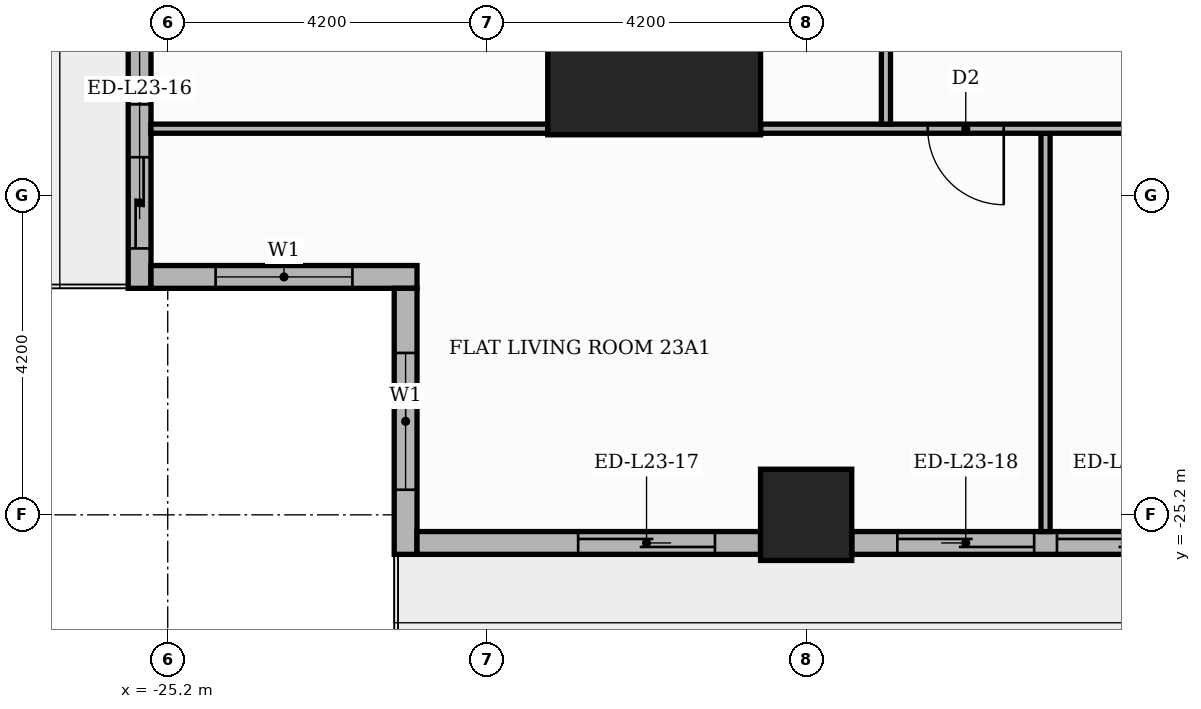
"""IFC4 building model, lengths in metres.
Left out: names, types, materials, properties, quantities, classifications, styles, units other than length and angle.
Written with IfcOpenShell. Run it as: python <this file> out.ifc"""

import sys

from ifc_helpers import new_model, si_unit, direction, frame, frame_2d, origin, origin_2d, place, context, subcontext, project, spatial, rectangle, extrude, element, fill, save


model = new_model("IFC4")
c1 = context("Model", 3, precision=1e-05, world=origin(), true_north=direction((0.0, 1.0)))
c2 = subcontext(c1, "Body", "Model", "MODEL_VIEW")
j1 = project(units=[si_unit("LENGTHUNIT", "METRE"), si_unit("PLANEANGLEUNIT", "RADIAN")], contexts=[c1])
p1 = place(None, origin())
s1 = spatial("IfcSite", under=j1, at=p1, CompositionType="ELEMENT")
p2 = place(p1, origin())
s2 = spatial("IfcBuilding", under=s1, at=p2, CompositionType="ELEMENT")
p3 = place(p2, frame((0.0, 0.0, 98.7)))
s3 = spatial("IfcBuildingStorey", under=s2, at=p3, CompositionType="ELEMENT", Elevation=98.7)
p4 = place(p3, frame((-18.8, -18.8, 0.0), z_axis=(0.0, 0.0, 1.0), x_axis=(1.0, 0.0, 0.0)))
e1 = element("IfcColumn", 1, at=p4, inside=s3, PredefinedType="COLUMN", context=c2, shape_type="SweptSolid", body=[
    extrude(rectangle(XDim=2.8, YDim=2.8, at=origin_2d()), origin(), (0.0, 0.0, 1.0), 3.9),
])
p5 = place(p3, frame((-16.8, -25.2, 0.0), z_axis=(0.0, 0.0, 1.0), x_axis=(1.0, 0.0, 0.0)))
e2 = element("IfcColumn", 2, at=p5, inside=s3, PredefinedType="COLUMN", context=c2, shape_type="SweptSolid", body=[
    extrude(rectangle(XDim=1.2, YDim=1.2, at=origin_2d()), origin(), (0.0, 0.0, 1.0), 3.9),
])
p6 = place(p3, frame((-25.57, -17.4, 0.0), z_axis=(0.0, 0.0, 1.0), x_axis=(0.0, -1.0, 0.0)))
e3 = element("IfcWall", 3, at=p6, inside=s3, PredefinedType="STANDARD", context=c2, shape_type="SweptSolid", body=[
    extrude(rectangle(XDim=4.82, YDim=0.3, at=frame_2d((2.41, 0.0))), origin(), (0.0, 0.0, 1.0), 3.48),
])
p7 = place(p6, frame((0.6, 0.0, 0.9)))
e4 = element("IfcOpeningElement", 4, at=p7, cuts=e3, PredefinedType="OPENING", context=c2, shape_type="SweptSolid", body=[
    extrude(rectangle(XDim=1.8, YDim=2.1, at=frame_2d((0.9, 1.05))), frame((0.0, 0.16, 0.0), z_axis=(0.0, -1.0, 0.0), x_axis=(1.0, 0.0, 0.0)), (0.0, 0.0, 1.0), 0.32),
])
p8 = place(p6, frame((3.095, 0.0, 0.0)))
e5 = element("IfcOpeningElement", 5, at=p8, cuts=e3, PredefinedType="OPENING", context=c2, shape_type="SweptSolid", body=[
    extrude(rectangle(XDim=1.2, YDim=2.4, at=frame_2d((0.6, 1.2))), frame((0.0, 0.16, 0.0), z_axis=(0.0, -1.0, 0.0), x_axis=(1.0, 0.0, 0.0)), (0.0, 0.0, 1.0), 0.32),
])
p9 = place(p3, frame((-25.42, -22.07, 0.0), z_axis=(0.0, 0.0, 1.0), x_axis=(1.0, 0.0, 0.0)))
e6 = element("IfcWall", 6, at=p9, inside=s3, PredefinedType="STANDARD", context=c2, shape_type="SweptSolid", body=[
    extrude(rectangle(XDim=3.5, YDim=0.3, at=frame_2d((1.75, 0.0))), origin(), (0.0, 0.0, 1.0), 3.48),
])
p10 = place(p9, frame((0.85, 0.0, 0.9)))
e7 = element("IfcOpeningElement", 7, at=p10, cuts=e6, PredefinedType="OPENING", context=c2, shape_type="SweptSolid", body=[
    extrude(rectangle(XDim=1.8, YDim=2.1, at=frame_2d((0.9, 1.05))), frame((0.0, 0.16, 0.0), z_axis=(0.0, -1.0, 0.0), x_axis=(1.0, 0.0, 0.0)), (0.0, 0.0, 1.0), 0.32),
])
p11 = place(p3, frame((-22.07, -22.22, 0.0), z_axis=(0.0, 0.0, 1.0), x_axis=(0.0, -1.0, 0.0)))
e8 = element("IfcWall", 8, at=p11, inside=s3, PredefinedType="STANDARD", context=c2, shape_type="SweptSolid", body=[
    extrude(rectangle(XDim=3.5, YDim=0.3, at=frame_2d((1.75, 0.0))), origin(), (0.0, 0.0, 1.0), 3.48),
])
p12 = place(p11, frame((0.85, 0.0, 0.9)))
e9 = element("IfcOpeningElement", 9, at=p12, cuts=e8, PredefinedType="OPENING", context=c2, shape_type="SweptSolid", body=[
    extrude(rectangle(XDim=1.8, YDim=2.1, at=frame_2d((0.9, 1.05))), frame((0.0, 0.16, 0.0), z_axis=(0.0, -1.0, 0.0), x_axis=(1.0, 0.0, 0.0)), (0.0, 0.0, 1.0), 0.32),
])
p13 = place(p3, frame((-21.92, -25.57, 0.0), z_axis=(0.0, 0.0, 1.0), x_axis=(1.0, 0.0, 0.0)))
e10 = element("IfcWall", 10, at=p13, inside=s3, PredefinedType="STANDARD", context=c2, shape_type="SweptSolid", body=[
    extrude(rectangle(XDim=4.52, YDim=0.3, at=frame_2d((2.26, 0.0))), origin(), (0.0, 0.0, 1.0), 3.48),
])
p14 = place(p13, frame((2.12, 0.0, 0.0)))
e11 = element("IfcOpeningElement", 11, at=p14, cuts=e10, PredefinedType="OPENING", context=c2, shape_type="SweptSolid", body=[
    extrude(rectangle(XDim=1.8, YDim=2.4, at=frame_2d((0.9, 1.2))), frame((0.0, 0.16, 0.0), z_axis=(0.0, -1.0, 0.0), x_axis=(1.0, 0.0, 0.0)), (0.0, 0.0, 1.0), 0.32),
])
p15 = place(p3, frame((-16.2, -25.57, 0.0), z_axis=(0.0, 0.0, 1.0), x_axis=(1.0, 0.0, 0.0)))
e12 = element("IfcWall", 12, at=p15, inside=s3, PredefinedType="STANDARD", context=c2, shape_type="SweptSolid", body=[
    extrude(rectangle(XDim=7.2, YDim=0.3, at=frame_2d((3.6, 0.0))), origin(), (0.0, 0.0, 1.0), 3.48),
])
p16 = place(p15, frame((0.6, 0.0, 0.0)))
e13 = element("IfcOpeningElement", 13, at=p16, cuts=e12, PredefinedType="OPENING", context=c2, shape_type="SweptSolid", body=[
    extrude(rectangle(XDim=1.8, YDim=2.4, at=frame_2d((0.9, 1.2))), frame((0.0, 0.16, 0.0), z_axis=(0.0, -1.0, 0.0), x_axis=(1.0, 0.0, 0.0)), (0.0, 0.0, 1.0), 0.32),
])
p17 = place(p15, frame((2.7, 0.0, 0.0)))
e14 = element("IfcOpeningElement", 14, at=p17, cuts=e12, PredefinedType="OPENING", context=c2, shape_type="SweptSolid", body=[
    extrude(rectangle(XDim=1.8, YDim=2.4, at=frame_2d((0.9, 1.2))), frame((0.0, 0.16, 0.0), z_axis=(0.0, -1.0, 0.0), x_axis=(1.0, 0.0, 0.0)), (0.0, 0.0, 1.0), 0.32),
])
p18 = place(p15, frame((4.8, 0.0, 0.9)))
e15 = element("IfcOpeningElement", 15, at=p18, cuts=e12, PredefinedType="OPENING", context=c2, shape_type="SweptSolid", body=[
    extrude(rectangle(XDim=1.8, YDim=2.1, at=frame_2d((0.9, 1.05))), frame((0.0, 0.16, 0.0), z_axis=(0.0, -1.0, 0.0), x_axis=(1.0, 0.0, 0.0)), (0.0, 0.0, 1.0), 0.32),
])
p19 = place(p3, frame((-13.65, -25.42, 0.0), z_axis=(0.0, 0.0, 1.0), x_axis=(0.0, 1.0, 0.0)))
e16 = element("IfcWall", 16, at=p19, inside=s3, PredefinedType="PARTITIONING", context=c2, shape_type="SweptSolid", body=[
    extrude(rectangle(XDim=5.24, YDim=0.12, at=frame_2d((2.62, 0.0))), origin(), (0.0, 0.0, 1.0), 3.48),
])
p20 = place(p3, frame((-25.42, -20.12, 0.0), z_axis=(0.0, 0.0, 1.0), x_axis=(1.0, 0.0, 0.0)))
e17 = element("IfcWall", 17, at=p20, inside=s3, PredefinedType="PARTITIONING", context=c2, shape_type="SweptSolid", body=[
    extrude(rectangle(XDim=5.22, YDim=0.12, at=frame_2d((2.61, 0.0))), origin(), (0.0, 0.0, 1.0), 3.48),
])
p21 = place(p3, frame((-17.4, -20.12, 0.0), z_axis=(0.0, 0.0, 1.0), x_axis=(1.0, 0.0, 0.0)))
e18 = element("IfcWall", 18, at=p21, inside=s3, PredefinedType="PARTITIONING", context=c2, shape_type="SweptSolid", body=[
    extrude(rectangle(XDim=12.05, YDim=0.12, at=frame_2d((6.025, 0.0))), origin(), (0.0, 0.0, 1.0), 3.48),
])
p22 = place(p21, frame((2.2, 0.0, 0.0)))
e19 = element("IfcOpeningElement", 19, at=p22, cuts=e18, PredefinedType="OPENING", context=c2, shape_type="SweptSolid", body=[
    extrude(rectangle(XDim=1.0, YDim=2.1, at=frame_2d((0.5, 1.05))), frame((0.0, 0.07, 0.0), z_axis=(0.0, -1.0, 0.0), x_axis=(1.0, 0.0, 0.0)), (0.0, 0.0, 1.0), 0.14),
])
p23 = place(p21, frame((5.4, 0.0, 0.0)))
e20 = element("IfcOpeningElement", 20, at=p23, cuts=e18, PredefinedType="OPENING", context=c2, shape_type="SweptSolid", body=[
    extrude(rectangle(XDim=0.9, YDim=2.1, at=frame_2d((0.45, 1.05))), frame((0.0, 0.07, 0.0), z_axis=(0.0, -1.0, 0.0), x_axis=(1.0, 0.0, 0.0)), (0.0, 0.0, 1.0), 0.14),
])
p24 = place(p3, frame((-15.75, -20.06, 0.0), z_axis=(0.0, 0.0, 1.0), x_axis=(0.0, 1.0, 0.0)))
e21 = element("IfcWall", 21, at=p24, inside=s3, PredefinedType="PARTITIONING", context=c2, shape_type="SweptSolid", body=[
    extrude(rectangle(XDim=6.31, YDim=0.12, at=frame_2d((3.155, 0.0))), origin(), (0.0, 0.0, 1.0), 3.48),
])
p25 = place(p24, frame((2.675, 0.0, 0.0)))
e22 = element("IfcOpeningElement", 22, at=p25, cuts=e21, PredefinedType="OPENING", context=c2, shape_type="SweptSolid", body=[
    extrude(rectangle(XDim=1.0, YDim=2.1, at=frame_2d((0.5, 1.05))), frame((0.0, 0.07, 0.0), z_axis=(0.0, -1.0, 0.0), x_axis=(1.0, 0.0, 0.0)), (0.0, 0.0, 1.0), 0.14),
])
p26 = place(p7, origin())
e23 = element("IfcWindow", 23, at=p26, inside=s3, PartitioningType="SINGLE_PANEL", PredefinedType="WINDOW", context=c2, shape_type="SweptSolid", body=[
    extrude(rectangle(XDim=1.8, YDim=2.1, at=frame_2d((0.9, 1.05))), frame((0.0, 0.03, 0.0), z_axis=(0.0, -1.0, 0.0), x_axis=(1.0, 0.0, 0.0)), (0.0, 0.0, 1.0), 0.06),
])
fill(e4, e23)
p27 = place(p8, origin())
e24 = element("IfcDoor", 24, at=p27, inside=s3, OperationType="SLIDING_TO_RIGHT", PredefinedType="DOOR", context=c2, shape_type="SweptSolid", body=[
    extrude(rectangle(XDim=1.2, YDim=2.4, at=frame_2d((0.6, 1.2))), frame((0.0, 0.025, 0.0), z_axis=(0.0, -1.0, 0.0), x_axis=(1.0, 0.0, 0.0)), (0.0, 0.0, 1.0), 0.05),
])
fill(e5, e24)
p28 = place(p10, origin())
e25 = element("IfcWindow", 25, at=p28, inside=s3, PartitioningType="SINGLE_PANEL", PredefinedType="WINDOW", context=c2, shape_type="SweptSolid", body=[
    extrude(rectangle(XDim=1.8, YDim=2.1, at=frame_2d((0.9, 1.05))), frame((0.0, 0.03, 0.0), z_axis=(0.0, -1.0, 0.0), x_axis=(1.0, 0.0, 0.0)), (0.0, 0.0, 1.0), 0.06),
])
fill(e7, e25)
p29 = place(p12, origin())
e26 = element("IfcWindow", 26, at=p29, inside=s3, PartitioningType="SINGLE_PANEL", PredefinedType="WINDOW", context=c2, shape_type="SweptSolid", body=[
    extrude(rectangle(XDim=1.8, YDim=2.1, at=frame_2d((0.9, 1.05))), frame((0.0, 0.03, 0.0), z_axis=(0.0, -1.0, 0.0), x_axis=(1.0, 0.0, 0.0)), (0.0, 0.0, 1.0), 0.06),
])
fill(e9, e26)
p30 = place(p14, origin())
e27 = element("IfcDoor", 27, at=p30, inside=s3, OperationType="SLIDING_TO_RIGHT", PredefinedType="DOOR", context=c2, shape_type="SweptSolid", body=[
    extrude(rectangle(XDim=1.8, YDim=2.4, at=frame_2d((0.9, 1.2))), frame((0.0, 0.025, 0.0), z_axis=(0.0, -1.0, 0.0), x_axis=(1.0, 0.0, 0.0)), (0.0, 0.0, 1.0), 0.05),
])
fill(e11, e27)
p31 = place(p16, origin())
e28 = element("IfcDoor", 28, at=p31, inside=s3, OperationType="SLIDING_TO_LEFT", PredefinedType="DOOR", context=c2, shape_type="SweptSolid", body=[
    extrude(rectangle(XDim=1.8, YDim=2.4, at=frame_2d((0.9, 1.2))), frame((0.0, 0.025, 0.0), z_axis=(0.0, -1.0, 0.0), x_axis=(1.0, 0.0, 0.0)), (0.0, 0.0, 1.0), 0.05),
])
fill(e13, e28)
p32 = place(p17, origin())
e29 = element("IfcDoor", 29, at=p32, inside=s3, OperationType="SLIDING_TO_RIGHT", PredefinedType="DOOR", context=c2, shape_type="SweptSolid", body=[
    extrude(rectangle(XDim=1.8, YDim=2.4, at=frame_2d((0.9, 1.2))), frame((0.0, 0.025, 0.0), z_axis=(0.0, -1.0, 0.0), x_axis=(1.0, 0.0, 0.0)), (0.0, 0.0, 1.0), 0.05),
])
fill(e14, e29)
p33 = place(p22, frame((1.0, 0.0, 0.0), z_axis=(0.0, 0.0, 1.0), x_axis=(-1.0, 0.0, 0.0)))
e30 = element("IfcDoor", 30, at=p33, inside=s3, OperationType="SINGLE_SWING_RIGHT", PredefinedType="DOOR", context=c2, shape_type="SweptSolid", body=[
    extrude(rectangle(XDim=1.0, YDim=2.1, at=frame_2d((0.5, 1.05))), frame((0.0, 0.025, 0.0), z_axis=(0.0, -1.0, 0.0), x_axis=(1.0, 0.0, 0.0)), (0.0, 0.0, 1.0), 0.05),
])
fill(e19, e30)
save(model, sys.argv[1])
